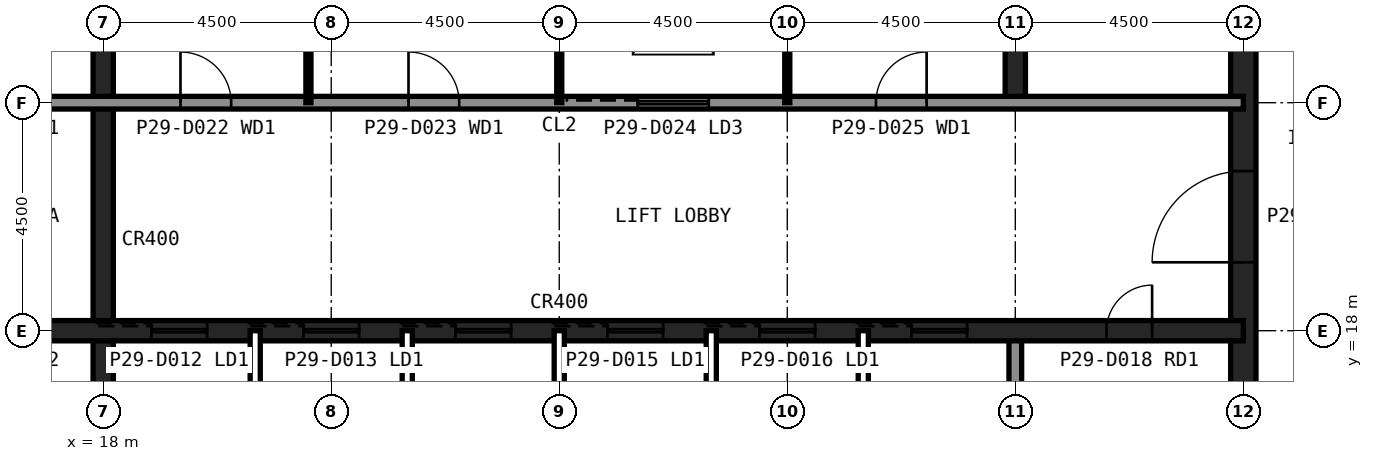
"""IFC4 building model, lengths in metres.
Left out: names, types, materials, properties, quantities, classifications, styles, units other than length and angle.
Written with IfcOpenShell. Run it as: python <this file> out.ifc"""

import sys

from ifc_helpers import new_model, si_unit, direction, frame, frame_2d, origin, place, context, subcontext, project, spatial, rectangle, extrude, element, fill, save


model = new_model("IFC4")
c1 = context("Model", 3, precision=1e-05, world=origin(), true_north=direction((0.0, 1.0)))
c2 = subcontext(c1, "Body", "Model", "MODEL_VIEW")
j1 = project(units=[si_unit("LENGTHUNIT", "METRE"), si_unit("PLANEANGLEUNIT", "RADIAN")], contexts=[c1])
p1 = place(None, origin())
s1 = spatial("IfcSite", under=j1, at=p1, CompositionType="ELEMENT")
p2 = place(p1, origin())
s2 = spatial("IfcBuilding", under=s1, at=p2, CompositionType="ELEMENT")
p3 = place(p2, frame((0.0, 0.0, 127.6)))
s3 = spatial("IfcBuildingStorey", under=s2, at=p3, CompositionType="ELEMENT", Elevation=127.6)
p4 = place(p3, frame((40.5, 13.5, 0.0), z_axis=(0.0, 0.0, 1.0), x_axis=(0.0, 1.0, 0.0)))
e1 = element("IfcWall", 1, at=p4, inside=s3, PredefinedType="SHEAR", context=c2, shape_type="SweptSolid", body=[
    extrude(rectangle(XDim=27.0, YDim=0.5, at=frame_2d((13.5, 0.0))), origin(), (0.0, 0.0, 1.0), 4.0),
])
p5 = place(p4, frame((5.85, 0.0, 0.0)))
e2 = element("IfcOpeningElement", 2, at=p5, cuts=e1, PredefinedType="OPENING", context=c2, shape_type="SweptSolid", body=[
    extrude(rectangle(XDim=1.8, YDim=2.1, at=frame_2d((0.9, 1.05))), frame((0.0, 0.26, 0.0), z_axis=(0.0, -1.0, 0.0), x_axis=(1.0, 0.0, 0.0)), (0.0, 0.0, 1.0), 0.52),
])
p6 = place(p4, frame((19.65, 0.0, 0.0)))
e3 = element("IfcOpeningElement", 3, at=p6, cuts=e1, PredefinedType="OPENING", context=c2, shape_type="SweptSolid", body=[
    extrude(rectangle(XDim=1.2, YDim=2.1, at=frame_2d((0.6, 1.05))), frame((0.0, 0.26, 0.0), z_axis=(0.0, -1.0, 0.0), x_axis=(1.0, 0.0, 0.0)), (0.0, 0.0, 1.0), 0.52),
])
p7 = place(p3, frame((18.0, 13.5, 0.0), z_axis=(0.0, 0.0, 1.0), x_axis=(0.0, 1.0, 0.0)))
e4 = element("IfcWall", 4, at=p7, inside=s3, PredefinedType="SHEAR", context=c2, shape_type="SweptSolid", body=[
    extrude(rectangle(XDim=18.0, YDim=0.4, at=frame_2d((9.0, 0.0))), origin(), (0.0, 0.0, 1.0), 4.0),
])
p8 = place(p3, frame((36.0, 13.5, 0.0), z_axis=(0.0, 0.0, 1.0), x_axis=(0.0, 1.0, 0.0)))
e5 = element("IfcWall", 5, at=p8, inside=s3, PredefinedType="SOLIDWALL", context=c2, shape_type="SweptSolid", body=[
    extrude(rectangle(XDim=4.5, YDim=0.25, at=frame_2d((2.25, 0.0))), origin(), (0.0, 0.0, 1.0), 3.84),
])
p9 = place(p3, frame((36.0, 22.5, 0.0), z_axis=(0.0, 0.0, 1.0), x_axis=(0.0, 1.0, 0.0)))
e6 = element("IfcWall", 6, at=p9, inside=s3, PredefinedType="SHEAR", context=c2, shape_type="SweptSolid", body=[
    extrude(rectangle(XDim=18.0, YDim=0.4, at=frame_2d((9.0, 0.0))), origin(), (0.0, 0.0, 1.0), 4.0),
])
p10 = place(p3, frame((13.5, 18.0, 0.0), z_axis=(0.0, 0.0, 1.0), x_axis=(1.0, 0.0, 0.0)))
e7 = element("IfcWall", 7, at=p10, inside=s3, PredefinedType="SHEAR", context=c2, shape_type="SweptSolid", body=[
    extrude(rectangle(XDim=27.0, YDim=0.4, at=frame_2d((13.5, 0.0))), origin(), (0.0, 0.0, 1.0), 4.0),
])
p11 = place(p10, frame((24.3, 0.0, 0.0)))
e8 = element("IfcOpeningElement", 8, at=p11, cuts=e7, PredefinedType="OPENING", context=c2, shape_type="SweptSolid", body=[
    extrude(rectangle(XDim=0.9, YDim=2.1, at=frame_2d((0.45, 1.05))), frame((0.0, 0.21, 0.0), z_axis=(0.0, -1.0, 0.0), x_axis=(1.0, 0.0, 0.0)), (0.0, 0.0, 1.0), 0.42),
])
p12 = place(p10, frame((5.45, 0.0, 0.0)))
e9 = element("IfcOpeningElement", 9, at=p12, cuts=e7, PredefinedType="OPENING", context=c2, shape_type="SweptSolid", body=[
    extrude(rectangle(XDim=1.1, YDim=2.1, at=frame_2d((0.55, 1.05))), frame((0.0, 0.21, 0.0), z_axis=(0.0, -1.0, 0.0), x_axis=(1.0, 0.0, 0.0)), (0.0, 0.0, 1.0), 0.42),
])
p13 = place(p10, frame((8.45, 0.0, 0.0)))
e10 = element("IfcOpeningElement", 10, at=p13, cuts=e7, PredefinedType="OPENING", context=c2, shape_type="SweptSolid", body=[
    extrude(rectangle(XDim=1.1, YDim=2.1, at=frame_2d((0.55, 1.05))), frame((0.0, 0.21, 0.0), z_axis=(0.0, -1.0, 0.0), x_axis=(1.0, 0.0, 0.0)), (0.0, 0.0, 1.0), 0.42),
])
p14 = place(p10, frame((11.45, 0.0, 0.0)))
e11 = element("IfcOpeningElement", 11, at=p14, cuts=e7, PredefinedType="OPENING", context=c2, shape_type="SweptSolid", body=[
    extrude(rectangle(XDim=1.1, YDim=2.1, at=frame_2d((0.55, 1.05))), frame((0.0, 0.21, 0.0), z_axis=(0.0, -1.0, 0.0), x_axis=(1.0, 0.0, 0.0)), (0.0, 0.0, 1.0), 0.42),
])
p15 = place(p10, frame((14.45, 0.0, 0.0)))
e12 = element("IfcOpeningElement", 12, at=p15, cuts=e7, PredefinedType="OPENING", context=c2, shape_type="SweptSolid", body=[
    extrude(rectangle(XDim=1.1, YDim=2.1, at=frame_2d((0.55, 1.05))), frame((0.0, 0.21, 0.0), z_axis=(0.0, -1.0, 0.0), x_axis=(1.0, 0.0, 0.0)), (0.0, 0.0, 1.0), 0.42),
])
p16 = place(p10, frame((17.45, 0.0, 0.0)))
e13 = element("IfcOpeningElement", 13, at=p16, cuts=e7, PredefinedType="OPENING", context=c2, shape_type="SweptSolid", body=[
    extrude(rectangle(XDim=1.1, YDim=2.1, at=frame_2d((0.55, 1.05))), frame((0.0, 0.21, 0.0), z_axis=(0.0, -1.0, 0.0), x_axis=(1.0, 0.0, 0.0)), (0.0, 0.0, 1.0), 0.42),
])
p17 = place(p10, frame((20.45, 0.0, 0.0)))
e14 = element("IfcOpeningElement", 14, at=p17, cuts=e7, PredefinedType="OPENING", context=c2, shape_type="SweptSolid", body=[
    extrude(rectangle(XDim=1.1, YDim=2.1, at=frame_2d((0.55, 1.05))), frame((0.0, 0.21, 0.0), z_axis=(0.0, -1.0, 0.0), x_axis=(1.0, 0.0, 0.0)), (0.0, 0.0, 1.0), 0.42),
])
p18 = place(p10, frame((1.6, 0.0, 0.0)))
e15 = element("IfcOpeningElement", 15, at=p18, cuts=e7, PredefinedType="OPENING", context=c2, shape_type="SweptSolid", body=[
    extrude(rectangle(XDim=1.3, YDim=2.2, at=frame_2d((0.65, 1.1))), frame((0.0, 0.21, 0.0), z_axis=(0.0, -1.0, 0.0), x_axis=(1.0, 0.0, 0.0)), (0.0, 0.0, 1.0), 0.42),
])
p19 = place(p3, frame((13.5, 22.5, 0.0), z_axis=(0.0, 0.0, 1.0), x_axis=(1.0, 0.0, 0.0)))
e16 = element("IfcWall", 16, at=p19, inside=s3, PredefinedType="SOLIDWALL", context=c2, shape_type="SweptSolid", body=[
    extrude(rectangle(XDim=27.0, YDim=0.25, at=frame_2d((13.5, 0.0))), origin(), (0.0, 0.0, 1.0), 3.84),
])
p20 = place(p19, frame((1.65, 0.0, 0.0)))
e17 = element("IfcOpeningElement", 17, at=p20, cuts=e16, PredefinedType="OPENING", context=c2, shape_type="SweptSolid", body=[
    extrude(rectangle(XDim=1.2, YDim=2.1, at=frame_2d((0.6, 1.05))), frame((0.0, 0.135, 0.0), z_axis=(0.0, -1.0, 0.0), x_axis=(1.0, 0.0, 0.0)), (0.0, 0.0, 1.0), 0.27),
])
p21 = place(p19, frame((6.025, 0.0, 0.0)))
e18 = element("IfcOpeningElement", 18, at=p21, cuts=e16, PredefinedType="OPENING", context=c2, shape_type="SweptSolid", body=[
    extrude(rectangle(XDim=1.0, YDim=2.1, at=frame_2d((0.5, 1.05))), frame((0.0, 0.135, 0.0), z_axis=(0.0, -1.0, 0.0), x_axis=(1.0, 0.0, 0.0)), (0.0, 0.0, 1.0), 0.27),
])
p22 = place(p19, frame((10.525, 0.0, 0.0)))
e19 = element("IfcOpeningElement", 19, at=p22, cuts=e16, PredefinedType="OPENING", context=c2, shape_type="SweptSolid", body=[
    extrude(rectangle(XDim=1.0, YDim=2.1, at=frame_2d((0.5, 1.05))), frame((0.0, 0.135, 0.0), z_axis=(0.0, -1.0, 0.0), x_axis=(1.0, 0.0, 0.0)), (0.0, 0.0, 1.0), 0.27),
])
p23 = place(p19, frame((19.75, 0.0, 0.0)))
e20 = element("IfcOpeningElement", 20, at=p23, cuts=e16, PredefinedType="OPENING", context=c2, shape_type="SweptSolid", body=[
    extrude(rectangle(XDim=1.0, YDim=2.1, at=frame_2d((0.5, 1.05))), frame((0.0, 0.135, 0.0), z_axis=(0.0, -1.0, 0.0), x_axis=(1.0, 0.0, 0.0)), (0.0, 0.0, 1.0), 0.27),
])
p24 = place(p19, frame((15.05, 0.0, 0.0)))
e21 = element("IfcOpeningElement", 21, at=p24, cuts=e16, PredefinedType="OPENING", context=c2, shape_type="SweptSolid", body=[
    extrude(rectangle(XDim=1.4, YDim=2.4, at=frame_2d((0.7, 1.2))), frame((0.0, 0.135, 0.0), z_axis=(0.0, -1.0, 0.0), x_axis=(1.0, 0.0, 0.0)), (0.0, 0.0, 1.0), 0.27),
])
for number, where, z_axis, x_axis in (
    (22, (21.0, 13.5, 0.0), (0.0, 0.0, 1.0), (0.0, 1.0, 0.0)),
    (23, (24.0, 13.5, 0.0), (0.0, 0.0, 1.0), (0.0, 1.0, 0.0)),
    (24, (27.0, 13.5, 0.0), (0.0, 0.0, 1.0), (0.0, 1.0, 0.0)),
    (25, (30.0, 13.5, 0.0), (0.0, 0.0, 1.0), (0.0, 1.0, 0.0)),
    (26, (33.0, 13.5, 0.0), (0.0, 0.0, 1.0), (0.0, 1.0, 0.0)),
):
    element("IfcWall", number, at=place(p3, frame(where, z_axis=z_axis, x_axis=x_axis)), inside=s3, PredefinedType="PARTITIONING", context=c2, shape_type="SweptSolid", body=[
        extrude(rectangle(XDim=4.5, YDim=0.2, at=frame_2d((2.25, 0.0))), origin(), (0.0, 0.0, 1.0), 3.84),
    ])
for number, where, z_axis, x_axis in (
    (27, (22.05, 22.5, 0.0), (0.0, 0.0, 1.0), (0.0, 1.0, 0.0)),
    (28, (27.0, 22.5, 0.0), (0.0, 0.0, 1.0), (0.0, 1.0, 0.0)),
    (29, (31.5, 22.5, 0.0), (0.0, 0.0, 1.0), (0.0, 1.0, 0.0)),
):
    element("IfcWall", number, at=place(p3, frame(where, z_axis=z_axis, x_axis=x_axis)), inside=s3, PredefinedType="PLUMBINGWALL", context=c2, shape_type="SweptSolid", body=[
        extrude(rectangle(XDim=9.0, YDim=0.1, at=frame_2d((4.5, 0.0))), origin(), (0.0, 0.0, 1.0), 3.84),
    ])
p25 = place(p5, origin())
e30 = element("IfcDoor", 30, at=p25, inside=s3, OperationType="SINGLE_SWING_LEFT", PredefinedType="DOOR", context=c2, shape_type="SweptSolid", body=[
    extrude(rectangle(XDim=1.8, YDim=2.1, at=frame_2d((0.9, 1.05))), frame((0.0, 0.025, 0.0), z_axis=(0.0, -1.0, 0.0), x_axis=(1.0, 0.0, 0.0)), (0.0, 0.0, 1.0), 0.05),
])
fill(e2, e30)
p26 = place(p21, origin())
e31 = element("IfcDoor", 31, at=p26, inside=s3, OperationType="SINGLE_SWING_LEFT", PredefinedType="DOOR", context=c2, shape_type="SweptSolid", body=[
    extrude(rectangle(XDim=1.0, YDim=2.1, at=frame_2d((0.5, 1.05))), frame((0.0, 0.025, 0.0), z_axis=(0.0, -1.0, 0.0), x_axis=(1.0, 0.0, 0.0)), (0.0, 0.0, 1.0), 0.05),
])
fill(e18, e31)
p27 = place(p22, origin())
e32 = element("IfcDoor", 32, at=p27, inside=s3, OperationType="SINGLE_SWING_LEFT", PredefinedType="DOOR", context=c2, shape_type="SweptSolid", body=[
    extrude(rectangle(XDim=1.0, YDim=2.1, at=frame_2d((0.5, 1.05))), frame((0.0, 0.025, 0.0), z_axis=(0.0, -1.0, 0.0), x_axis=(1.0, 0.0, 0.0)), (0.0, 0.0, 1.0), 0.05),
])
fill(e19, e32)
p28 = place(p23, origin())
e33 = element("IfcDoor", 33, at=p28, inside=s3, OperationType="SINGLE_SWING_RIGHT", PredefinedType="DOOR", context=c2, shape_type="SweptSolid", body=[
    extrude(rectangle(XDim=1.0, YDim=2.1, at=frame_2d((0.5, 1.05))), frame((0.0, 0.025, 0.0), z_axis=(0.0, -1.0, 0.0), x_axis=(1.0, 0.0, 0.0)), (0.0, 0.0, 1.0), 0.05),
])
fill(e20, e33)
p29 = place(p11, origin())
e34 = element("IfcDoor", 34, at=p29, inside=s3, OperationType="SINGLE_SWING_RIGHT", PredefinedType="DOOR", context=c2, shape_type="SweptSolid", body=[
    extrude(rectangle(XDim=0.9, YDim=2.1, at=frame_2d((0.45, 1.05))), frame((0.0, 0.025, 0.0), z_axis=(0.0, -1.0, 0.0), x_axis=(1.0, 0.0, 0.0)), (0.0, 0.0, 1.0), 0.05),
])
fill(e8, e34)
p30 = place(p12, origin())
e35 = element("IfcDoor", 35, at=p30, inside=s3, OperationType="SLIDING_TO_LEFT", PredefinedType="DOOR", context=c2, shape_type="SweptSolid", body=[
    extrude(rectangle(XDim=1.1, YDim=2.1, at=frame_2d((0.55, 1.05))), frame((0.0, 0.025, 0.0), z_axis=(0.0, -1.0, 0.0), x_axis=(1.0, 0.0, 0.0)), (0.0, 0.0, 1.0), 0.05),
])
fill(e9, e35)
p31 = place(p13, origin())
e36 = element("IfcDoor", 36, at=p31, inside=s3, OperationType="SLIDING_TO_LEFT", PredefinedType="DOOR", context=c2, shape_type="SweptSolid", body=[
    extrude(rectangle(XDim=1.1, YDim=2.1, at=frame_2d((0.55, 1.05))), frame((0.0, 0.025, 0.0), z_axis=(0.0, -1.0, 0.0), x_axis=(1.0, 0.0, 0.0)), (0.0, 0.0, 1.0), 0.05),
])
fill(e10, e36)
p32 = place(p14, origin())
e37 = element("IfcDoor", 37, at=p32, inside=s3, OperationType="SLIDING_TO_LEFT", PredefinedType="DOOR", context=c2, shape_type="SweptSolid", body=[
    extrude(rectangle(XDim=1.1, YDim=2.1, at=frame_2d((0.55, 1.05))), frame((0.0, 0.025, 0.0), z_axis=(0.0, -1.0, 0.0), x_axis=(1.0, 0.0, 0.0)), (0.0, 0.0, 1.0), 0.05),
])
fill(e11, e37)
p33 = place(p15, origin())
e38 = element("IfcDoor", 38, at=p33, inside=s3, OperationType="SLIDING_TO_LEFT", PredefinedType="DOOR", context=c2, shape_type="SweptSolid", body=[
    extrude(rectangle(XDim=1.1, YDim=2.1, at=frame_2d((0.55, 1.05))), frame((0.0, 0.025, 0.0), z_axis=(0.0, -1.0, 0.0), x_axis=(1.0, 0.0, 0.0)), (0.0, 0.0, 1.0), 0.05),
])
fill(e12, e38)
p34 = place(p16, origin())
e39 = element("IfcDoor", 39, at=p34, inside=s3, OperationType="SLIDING_TO_LEFT", PredefinedType="DOOR", context=c2, shape_type="SweptSolid", body=[
    extrude(rectangle(XDim=1.1, YDim=2.1, at=frame_2d((0.55, 1.05))), frame((0.0, 0.025, 0.0), z_axis=(0.0, -1.0, 0.0), x_axis=(1.0, 0.0, 0.0)), (0.0, 0.0, 1.0), 0.05),
])
fill(e13, e39)
p35 = place(p17, origin())
e40 = element("IfcDoor", 40, at=p35, inside=s3, OperationType="SLIDING_TO_LEFT", PredefinedType="DOOR", context=c2, shape_type="SweptSolid", body=[
    extrude(rectangle(XDim=1.1, YDim=2.1, at=frame_2d((0.55, 1.05))), frame((0.0, 0.025, 0.0), z_axis=(0.0, -1.0, 0.0), x_axis=(1.0, 0.0, 0.0)), (0.0, 0.0, 1.0), 0.05),
])
fill(e14, e40)
p36 = place(p24, origin())
e41 = element("IfcDoor", 41, at=p36, inside=s3, OperationType="SLIDING_TO_LEFT", PredefinedType="DOOR", context=c2, shape_type="SweptSolid", body=[
    extrude(rectangle(XDim=1.4, YDim=2.4, at=frame_2d((0.7, 1.2))), frame((0.0, 0.025, 0.0), z_axis=(0.0, -1.0, 0.0), x_axis=(1.0, 0.0, 0.0)), (0.0, 0.0, 1.0), 0.05),
])
fill(e21, e41)
save(model, sys.argv[1])
